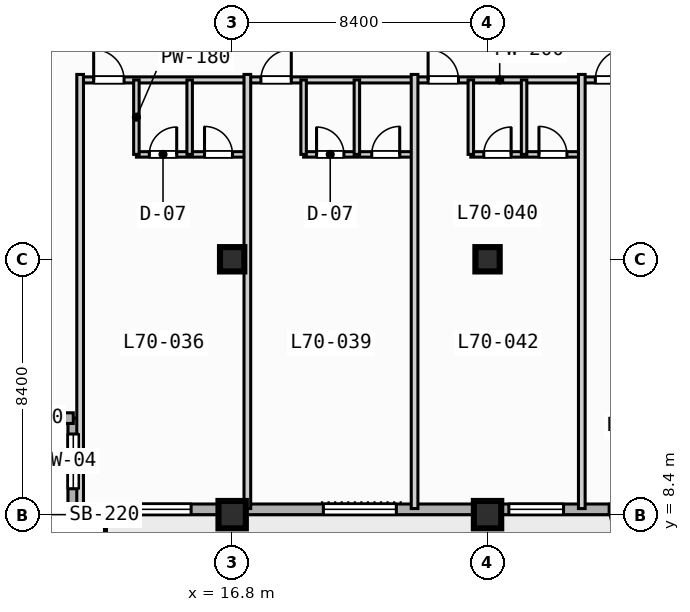
"""IFC4 building model, lengths in metres.
Left out: names, types, materials, properties, quantities, classifications, styles, units other than length and angle.
Written with IfcOpenShell. Run it as: python <this file> out.ifc"""

import sys

from ifc_helpers import new_model, si_unit, direction, frame, frame_2d, origin, origin_2d, place, context, subcontext, project, spatial, rectangle, extrude, element, fill, save


model = new_model("IFC4")
c1 = context("Model", 3, precision=1e-05, world=origin(), true_north=direction((0.0, 1.0)))
c2 = subcontext(c1, "Body", "Model", "MODEL_VIEW")
j1 = project(units=[si_unit("LENGTHUNIT", "METRE"), si_unit("PLANEANGLEUNIT", "RADIAN")], contexts=[c1])
p1 = place(None, origin())
s1 = spatial("IfcSite", under=j1, at=p1, CompositionType="ELEMENT")
p2 = place(p1, origin())
s2 = spatial("IfcBuilding", under=s1, at=p2, CompositionType="ELEMENT")
p3 = place(p2, frame((0.0, 0.0, 282.3)))
s3 = spatial("IfcBuildingStorey", under=s2, at=p3, CompositionType="ELEMENT", Elevation=282.3)
p4 = place(p3, frame((16.8, 8.4, 0.0), z_axis=(0.0, 0.0, 1.0), x_axis=(1.0, 0.0, 0.0)))
e1 = element("IfcColumn", 1, at=p4, inside=s3, PredefinedType="COLUMN", context=c2, shape_type="SweptSolid", body=[
    extrude(rectangle(XDim=0.9, YDim=0.9, at=origin_2d()), origin(), (0.0, 0.0, 1.0), 3.7),
])
p5 = place(p3, frame((16.8, 16.8, 0.0), z_axis=(0.0, 0.0, 1.0), x_axis=(1.0, 0.0, 0.0)))
e2 = element("IfcColumn", 2, at=p5, inside=s3, PredefinedType="COLUMN", context=c2, shape_type="SweptSolid", body=[
    extrude(rectangle(XDim=0.8, YDim=0.8, at=origin_2d()), origin(), (0.0, 0.0, 1.0), 3.7),
])
p6 = place(p3, frame((25.2, 8.4, 0.0), z_axis=(0.0, 0.0, 1.0), x_axis=(1.0, 0.0, 0.0)))
e3 = element("IfcColumn", 3, at=p6, inside=s3, PredefinedType="COLUMN", context=c2, shape_type="SweptSolid", body=[
    extrude(rectangle(XDim=0.9, YDim=0.9, at=origin_2d()), origin(), (0.0, 0.0, 1.0), 3.7),
])
p7 = place(p3, frame((25.2, 16.8, 0.0), z_axis=(0.0, 0.0, 1.0), x_axis=(1.0, 0.0, 0.0)))
e4 = element("IfcColumn", 4, at=p7, inside=s3, PredefinedType="COLUMN", context=c2, shape_type="SweptSolid", body=[
    extrude(rectangle(XDim=0.8, YDim=0.8, at=origin_2d()), origin(), (0.0, 0.0, 1.0), 3.7),
])
p8 = place(p3, frame((11.575, 8.575, 0.0), z_axis=(0.0, 0.0, 1.0), x_axis=(0.0, 1.0, 0.0)))
e5 = element("IfcWall", 5, at=p8, inside=s3, PredefinedType="STANDARD", context=c2, shape_type="SweptSolid", body=[
    extrude(rectangle(XDim=3.0, YDim=0.35, at=frame_2d((1.5, 0.0))), origin(), (0.0, 0.0, 1.0), 3.47),
])
p9 = place(p8, frame((0.677, 0.0, 0.85)))
e6 = element("IfcOpeningElement", 6, at=p9, cuts=e5, PredefinedType="OPENING", context=c2, shape_type="SweptSolid", body=[
    extrude(rectangle(XDim=1.8, YDim=1.8, at=frame_2d((0.9, 0.9))), frame((0.0, 0.185, 0.0), z_axis=(0.0, -1.0, 0.0), x_axis=(1.0, 0.0, 0.0)), (0.0, 0.0, 1.0), 0.37),
])
p10 = place(p3, frame((11.575, 11.575, 0.0), z_axis=(0.0, 0.0, 1.0), x_axis=(-1.0, 0.0, 0.0)))
e7 = element("IfcWall", 7, at=p10, inside=s3, PredefinedType="STANDARD", context=c2, shape_type="SweptSolid", body=[
    extrude(rectangle(XDim=3.0, YDim=0.35, at=frame_2d((1.5, 0.0))), origin(), (0.0, 0.0, 1.0), 3.47),
])
p11 = place(p3, frame((72.425, 8.575, 0.0), z_axis=(0.0, 0.0, 1.0), x_axis=(-1.0, 0.0, 0.0)))
e8 = element("IfcWall", 8, at=p11, inside=s3, PredefinedType="STANDARD", context=c2, shape_type="SweptSolid", body=[
    extrude(rectangle(XDim=60.85, YDim=0.35, at=frame_2d((30.425, 0.0))), origin(), (0.0, 0.0, 1.0), 3.47),
])
p12 = place(p11, frame((41.825, 0.0, 0.0)))
e9 = element("IfcOpeningElement", 9, at=p12, cuts=e8, PredefinedType="OPENING", context=c2, shape_type="SweptSolid", body=[
    extrude(rectangle(XDim=1.4, YDim=2.2, at=frame_2d((0.7, 1.1))), frame((0.0, 0.185, 0.0), z_axis=(0.0, -1.0, 0.0), x_axis=(1.0, 0.0, 0.0)), (0.0, 0.0, 1.0), 0.37),
])
p13 = place(p11, frame((50.225, 0.0, 0.85)))
e10 = element("IfcOpeningElement", 10, at=p13, cuts=e8, PredefinedType="OPENING", context=c2, shape_type="SweptSolid", body=[
    extrude(rectangle(XDim=2.4, YDim=1.95, at=frame_2d((1.2, 0.975))), frame((0.0, 0.185, 0.0), z_axis=(0.0, -1.0, 0.0), x_axis=(1.0, 0.0, 0.0)), (0.0, 0.0, 1.0), 0.37),
])
p14 = place(p11, frame((33.425, 0.0, 0.85)))
e11 = element("IfcOpeningElement", 11, at=p14, cuts=e8, PredefinedType="OPENING", context=c2, shape_type="SweptSolid", body=[
    extrude(rectangle(XDim=2.4, YDim=1.95, at=frame_2d((1.2, 0.975))), frame((0.0, 0.185, 0.0), z_axis=(0.0, -1.0, 0.0), x_axis=(1.0, 0.0, 0.0)), (0.0, 0.0, 1.0), 0.37),
])
p15 = place(p11, frame((25.325, 0.0, 0.85)))
e12 = element("IfcOpeningElement", 12, at=p15, cuts=e8, PredefinedType="OPENING", context=c2, shape_type="SweptSolid", body=[
    extrude(rectangle(XDim=1.8, YDim=1.8, at=frame_2d((0.9, 0.9))), frame((0.0, 0.185, 0.0), z_axis=(0.0, -1.0, 0.0), x_axis=(1.0, 0.0, 0.0)), (0.0, 0.0, 1.0), 0.37),
])
p16 = place(p11, frame((56.975, 0.0, 0.85)))
e13 = element("IfcOpeningElement", 13, at=p16, cuts=e8, PredefinedType="OPENING", context=c2, shape_type="SweptSolid", body=[
    extrude(rectangle(XDim=1.8, YDim=1.8, at=frame_2d((0.9, 0.9))), frame((0.0, 0.185, 0.0), z_axis=(0.0, -1.0, 0.0), x_axis=(1.0, 0.0, 0.0)), (0.0, 0.0, 1.0), 0.37),
])
p17 = place(p11, frame((44.725, 0.0, 0.85)))
e14 = element("IfcOpeningElement", 14, at=p17, cuts=e8, PredefinedType="OPENING", context=c2, shape_type="SweptSolid", body=[
    extrude(rectangle(XDim=1.8, YDim=1.8, at=frame_2d((0.9, 0.9))), frame((0.0, 0.185, 0.0), z_axis=(0.0, -1.0, 0.0), x_axis=(1.0, 0.0, 0.0)), (0.0, 0.0, 1.0), 0.37),
])
p18 = place(p3, frame((11.8, 22.7, 0.0), z_axis=(0.0, 0.0, 1.0), x_axis=(1.0, 0.0, 0.0)))
e15 = element("IfcWall", 15, at=p18, inside=s3, PredefinedType="PARTITIONING", context=c2, shape_type="SweptSolid", body=[
    extrude(rectangle(XDim=27.6, YDim=0.2, at=frame_2d((13.8, 0.0))), origin(), (0.0, 0.0, 1.0), 3.47),
])
p19 = place(p18, frame((0.445, 0.0, 0.0)))
e16 = element("IfcOpeningElement", 16, at=p19, cuts=e15, PredefinedType="OPENING", context=c2, shape_type="SweptSolid", body=[
    extrude(rectangle(XDim=1.0, YDim=2.15, at=frame_2d((0.5, 1.075))), frame((0.0, 0.11, 0.0), z_axis=(0.0, -1.0, 0.0), x_axis=(1.0, 0.0, 0.0)), (0.0, 0.0, 1.0), 0.22),
])
p20 = place(p18, frame((5.945, 0.0, 0.0)))
e17 = element("IfcOpeningElement", 17, at=p20, cuts=e15, PredefinedType="OPENING", context=c2, shape_type="SweptSolid", body=[
    extrude(rectangle(XDim=1.0, YDim=2.15, at=frame_2d((0.5, 1.075))), frame((0.0, 0.11, 0.0), z_axis=(0.0, -1.0, 0.0), x_axis=(1.0, 0.0, 0.0)), (0.0, 0.0, 1.0), 0.22),
])
p21 = place(p18, frame((11.445, 0.0, 0.0)))
e18 = element("IfcOpeningElement", 18, at=p21, cuts=e15, PredefinedType="OPENING", context=c2, shape_type="SweptSolid", body=[
    extrude(rectangle(XDim=1.0, YDim=2.15, at=frame_2d((0.5, 1.075))), frame((0.0, 0.11, 0.0), z_axis=(0.0, -1.0, 0.0), x_axis=(1.0, 0.0, 0.0)), (0.0, 0.0, 1.0), 0.22),
])
p22 = place(p18, frame((16.945, 0.0, 0.0)))
e19 = element("IfcOpeningElement", 19, at=p22, cuts=e15, PredefinedType="OPENING", context=c2, shape_type="SweptSolid", body=[
    extrude(rectangle(XDim=1.0, YDim=2.15, at=frame_2d((0.5, 1.075))), frame((0.0, 0.11, 0.0), z_axis=(0.0, -1.0, 0.0), x_axis=(1.0, 0.0, 0.0)), (0.0, 0.0, 1.0), 0.22),
])
p23 = place(p18, frame((22.445, 0.0, 0.0)))
e20 = element("IfcOpeningElement", 20, at=p23, cuts=e15, PredefinedType="OPENING", context=c2, shape_type="SweptSolid", body=[
    extrude(rectangle(XDim=1.0, YDim=2.15, at=frame_2d((0.5, 1.075))), frame((0.0, 0.11, 0.0), z_axis=(0.0, -1.0, 0.0), x_axis=(1.0, 0.0, 0.0)), (0.0, 0.0, 1.0), 0.22),
])
p24 = place(p3, frame((11.8, 8.6, 0.0), z_axis=(0.0, 0.0, 1.0), x_axis=(0.0, 1.0, 0.0)))
e21 = element("IfcWall", 21, at=p24, inside=s3, PredefinedType="PARTITIONING", context=c2, shape_type="SweptSolid", body=[
    extrude(rectangle(XDim=14.28, YDim=0.22, at=frame_2d((7.14, 0.0))), origin(), (0.0, 0.0, 1.0), 3.47),
])
p25 = place(p3, frame((13.65, 20.25, 0.0), z_axis=(0.0, 0.0, 1.0), x_axis=(1.0, 0.0, 0.0)))
e22 = element("IfcWall", 22, at=p25, inside=s3, PredefinedType="PLUMBINGWALL", context=c2, shape_type="SweptSolid", body=[
    extrude(rectangle(XDim=3.65, YDim=0.18, at=frame_2d((1.825, 0.0))), origin(), (0.0, 0.0, 1.0), 3.47),
])
p26 = place(p25, frame((0.426, 0.0, 0.0)))
e23 = element("IfcOpeningElement", 23, at=p26, cuts=e22, PredefinedType="OPENING", context=c2, shape_type="SweptSolid", body=[
    extrude(rectangle(XDim=0.9, YDim=2.1, at=frame_2d((0.45, 1.05))), frame((0.0, 0.1, 0.0), z_axis=(0.0, -1.0, 0.0), x_axis=(1.0, 0.0, 0.0)), (0.0, 0.0, 1.0), 0.2),
])
p27 = place(p25, frame((2.241, 0.0, 0.0)))
e24 = element("IfcOpeningElement", 24, at=p27, cuts=e22, PredefinedType="OPENING", context=c2, shape_type="SweptSolid", body=[
    extrude(rectangle(XDim=0.92, YDim=2.1, at=frame_2d((0.46, 1.05))), frame((0.0, 0.1, 0.0), z_axis=(0.0, -1.0, 0.0), x_axis=(1.0, 0.0, 0.0)), (0.0, 0.0, 1.0), 0.2),
])
for number, where, z_axis, x_axis in (
    (25, (13.65, 20.25, 0.0), (0.0, 0.0, 1.0), (0.0, 1.0, 0.0)),
    (26, (15.402, 20.25, 0.0), (0.0, 0.0, 1.0), (0.0, 1.0, 0.0)),
):
    element("IfcWall", number, at=place(p3, frame(where, z_axis=z_axis, x_axis=x_axis)), inside=s3, PredefinedType="PLUMBINGWALL", context=c2, shape_type="SweptSolid", body=[
        extrude(rectangle(XDim=2.45, YDim=0.18, at=frame_2d((1.225, 0.0))), origin(), (0.0, 0.0, 1.0), 3.47),
    ])
p28 = place(p3, frame((17.3, 8.6, 0.0), z_axis=(0.0, 0.0, 1.0), x_axis=(0.0, 1.0, 0.0)))
e27 = element("IfcWall", 27, at=p28, inside=s3, PredefinedType="PARTITIONING", context=c2, shape_type="SweptSolid", body=[
    extrude(rectangle(XDim=14.28, YDim=0.22, at=frame_2d((7.14, 0.0))), origin(), (0.0, 0.0, 1.0), 3.47),
])
p29 = place(p3, frame((19.15, 20.25, 0.0), z_axis=(0.0, 0.0, 1.0), x_axis=(1.0, 0.0, 0.0)))
e28 = element("IfcWall", 28, at=p29, inside=s3, PredefinedType="PLUMBINGWALL", context=c2, shape_type="SweptSolid", body=[
    extrude(rectangle(XDim=3.65, YDim=0.18, at=frame_2d((1.825, 0.0))), origin(), (0.0, 0.0, 1.0), 3.47),
])
p30 = place(p29, frame((0.426, 0.0, 0.0)))
e29 = element("IfcOpeningElement", 29, at=p30, cuts=e28, PredefinedType="OPENING", context=c2, shape_type="SweptSolid", body=[
    extrude(rectangle(XDim=0.9, YDim=2.1, at=frame_2d((0.45, 1.05))), frame((0.0, 0.1, 0.0), z_axis=(0.0, -1.0, 0.0), x_axis=(1.0, 0.0, 0.0)), (0.0, 0.0, 1.0), 0.2),
])
p31 = place(p29, frame((2.241, 0.0, 0.0)))
e30 = element("IfcOpeningElement", 30, at=p31, cuts=e28, PredefinedType="OPENING", context=c2, shape_type="SweptSolid", body=[
    extrude(rectangle(XDim=0.92, YDim=2.1, at=frame_2d((0.46, 1.05))), frame((0.0, 0.1, 0.0), z_axis=(0.0, -1.0, 0.0), x_axis=(1.0, 0.0, 0.0)), (0.0, 0.0, 1.0), 0.2),
])
for number, where, z_axis, x_axis in (
    (31, (19.15, 20.25, 0.0), (0.0, 0.0, 1.0), (0.0, 1.0, 0.0)),
    (32, (20.902, 20.25, 0.0), (0.0, 0.0, 1.0), (0.0, 1.0, 0.0)),
):
    element("IfcWall", number, at=place(p3, frame(where, z_axis=z_axis, x_axis=x_axis)), inside=s3, PredefinedType="PLUMBINGWALL", context=c2, shape_type="SweptSolid", body=[
        extrude(rectangle(XDim=2.45, YDim=0.18, at=frame_2d((1.225, 0.0))), origin(), (0.0, 0.0, 1.0), 3.47),
    ])
p32 = place(p3, frame((22.8, 8.6, 0.0), z_axis=(0.0, 0.0, 1.0), x_axis=(0.0, 1.0, 0.0)))
e33 = element("IfcWall", 33, at=p32, inside=s3, PredefinedType="PARTITIONING", context=c2, shape_type="SweptSolid", body=[
    extrude(rectangle(XDim=14.28, YDim=0.22, at=frame_2d((7.14, 0.0))), origin(), (0.0, 0.0, 1.0), 3.47),
])
p33 = place(p3, frame((24.65, 20.25, 0.0), z_axis=(0.0, 0.0, 1.0), x_axis=(1.0, 0.0, 0.0)))
e34 = element("IfcWall", 34, at=p33, inside=s3, PredefinedType="PLUMBINGWALL", context=c2, shape_type="SweptSolid", body=[
    extrude(rectangle(XDim=3.65, YDim=0.18, at=frame_2d((1.825, 0.0))), origin(), (0.0, 0.0, 1.0), 3.47),
])
p34 = place(p33, frame((0.426, 0.0, 0.0)))
e35 = element("IfcOpeningElement", 35, at=p34, cuts=e34, PredefinedType="OPENING", context=c2, shape_type="SweptSolid", body=[
    extrude(rectangle(XDim=0.9, YDim=2.1, at=frame_2d((0.45, 1.05))), frame((0.0, 0.1, 0.0), z_axis=(0.0, -1.0, 0.0), x_axis=(1.0, 0.0, 0.0)), (0.0, 0.0, 1.0), 0.2),
])
p35 = place(p33, frame((2.241, 0.0, 0.0)))
e36 = element("IfcOpeningElement", 36, at=p35, cuts=e34, PredefinedType="OPENING", context=c2, shape_type="SweptSolid", body=[
    extrude(rectangle(XDim=0.92, YDim=2.1, at=frame_2d((0.46, 1.05))), frame((0.0, 0.1, 0.0), z_axis=(0.0, -1.0, 0.0), x_axis=(1.0, 0.0, 0.0)), (0.0, 0.0, 1.0), 0.2),
])
for number, where, z_axis, x_axis in (
    (37, (24.65, 20.25, 0.0), (0.0, 0.0, 1.0), (0.0, 1.0, 0.0)),
    (38, (26.402, 20.25, 0.0), (0.0, 0.0, 1.0), (0.0, 1.0, 0.0)),
):
    element("IfcWall", number, at=place(p3, frame(where, z_axis=z_axis, x_axis=x_axis)), inside=s3, PredefinedType="PLUMBINGWALL", context=c2, shape_type="SweptSolid", body=[
        extrude(rectangle(XDim=2.45, YDim=0.18, at=frame_2d((1.225, 0.0))), origin(), (0.0, 0.0, 1.0), 3.47),
    ])
p36 = place(p3, frame((28.3, 8.6, 0.0), z_axis=(0.0, 0.0, 1.0), x_axis=(0.0, 1.0, 0.0)))
e39 = element("IfcWall", 39, at=p36, inside=s3, PredefinedType="PARTITIONING", context=c2, shape_type="SweptSolid", body=[
    extrude(rectangle(XDim=14.28, YDim=0.22, at=frame_2d((7.14, 0.0))), origin(), (0.0, 0.0, 1.0), 3.47),
])
p37 = place(p9, origin())
e40 = element("IfcWindow", 40, at=p37, inside=s3, PartitioningType="SINGLE_PANEL", PredefinedType="WINDOW", context=c2, shape_type="SweptSolid", body=[
    extrude(rectangle(XDim=1.8, YDim=1.8, at=frame_2d((0.9, 0.9))), frame((0.0, 0.03, 0.0), z_axis=(0.0, -1.0, 0.0), x_axis=(1.0, 0.0, 0.0)), (0.0, 0.0, 1.0), 0.06),
])
fill(e6, e40)
p38 = place(p12, origin())
e41 = element("IfcDoor", 41, at=p38, inside=s3, OperationType="SINGLE_SWING_LEFT", PredefinedType="DOOR", context=c2, shape_type="SweptSolid", body=[
    extrude(rectangle(XDim=1.4, YDim=2.2, at=frame_2d((0.7, 1.1))), frame((0.0, 0.025, 0.0), z_axis=(0.0, -1.0, 0.0), x_axis=(1.0, 0.0, 0.0)), (0.0, 0.0, 1.0), 0.05),
])
fill(e9, e41)
p39 = place(p13, origin())
e42 = element("IfcWindow", 42, at=p39, inside=s3, PartitioningType="SINGLE_PANEL", PredefinedType="WINDOW", context=c2, shape_type="SweptSolid", body=[
    extrude(rectangle(XDim=2.4, YDim=1.95, at=frame_2d((1.2, 0.975))), frame((0.0, 0.03, 0.0), z_axis=(0.0, -1.0, 0.0), x_axis=(1.0, 0.0, 0.0)), (0.0, 0.0, 1.0), 0.06),
])
fill(e10, e42)
p40 = place(p16, origin())
e43 = element("IfcWindow", 43, at=p40, inside=s3, PartitioningType="SINGLE_PANEL", PredefinedType="WINDOW", context=c2, shape_type="SweptSolid", body=[
    extrude(rectangle(XDim=1.8, YDim=1.8, at=frame_2d((0.9, 0.9))), frame((0.0, 0.03, 0.0), z_axis=(0.0, -1.0, 0.0), x_axis=(1.0, 0.0, 0.0)), (0.0, 0.0, 1.0), 0.06),
])
fill(e13, e43)
p41 = place(p17, origin())
e44 = element("IfcWindow", 44, at=p41, inside=s3, PartitioningType="SINGLE_PANEL", PredefinedType="WINDOW", context=c2, shape_type="SweptSolid", body=[
    extrude(rectangle(XDim=1.8, YDim=1.8, at=frame_2d((0.9, 0.9))), frame((0.0, 0.03, 0.0), z_axis=(0.0, -1.0, 0.0), x_axis=(1.0, 0.0, 0.0)), (0.0, 0.0, 1.0), 0.06),
])
fill(e14, e44)
p42 = place(p19, origin())
e45 = element("IfcDoor", 45, at=p42, inside=s3, OperationType="SINGLE_SWING_LEFT", PredefinedType="DOOR", context=c2, shape_type="SweptSolid", body=[
    extrude(rectangle(XDim=1.0, YDim=2.15, at=frame_2d((0.5, 1.075))), frame((0.0, 0.025, 0.0), z_axis=(0.0, -1.0, 0.0), x_axis=(1.0, 0.0, 0.0)), (0.0, 0.0, 1.0), 0.05),
])
fill(e16, e45)
p43 = place(p20, origin())
e46 = element("IfcDoor", 46, at=p43, inside=s3, OperationType="SINGLE_SWING_RIGHT", PredefinedType="DOOR", context=c2, shape_type="SweptSolid", body=[
    extrude(rectangle(XDim=1.0, YDim=2.15, at=frame_2d((0.5, 1.075))), frame((0.0, 0.025, 0.0), z_axis=(0.0, -1.0, 0.0), x_axis=(1.0, 0.0, 0.0)), (0.0, 0.0, 1.0), 0.05),
])
fill(e17, e46)
p44 = place(p21, origin())
e47 = element("IfcDoor", 47, at=p44, inside=s3, OperationType="SINGLE_SWING_LEFT", PredefinedType="DOOR", context=c2, shape_type="SweptSolid", body=[
    extrude(rectangle(XDim=1.0, YDim=2.15, at=frame_2d((0.5, 1.075))), frame((0.0, 0.025, 0.0), z_axis=(0.0, -1.0, 0.0), x_axis=(1.0, 0.0, 0.0)), (0.0, 0.0, 1.0), 0.05),
])
fill(e18, e47)
p45 = place(p22, origin())
e48 = element("IfcDoor", 48, at=p45, inside=s3, OperationType="SINGLE_SWING_RIGHT", PredefinedType="DOOR", context=c2, shape_type="SweptSolid", body=[
    extrude(rectangle(XDim=1.0, YDim=2.15, at=frame_2d((0.5, 1.075))), frame((0.0, 0.025, 0.0), z_axis=(0.0, -1.0, 0.0), x_axis=(1.0, 0.0, 0.0)), (0.0, 0.0, 1.0), 0.05),
])
fill(e19, e48)
p46 = place(p26, origin())
e49 = element("IfcDoor", 49, at=p46, inside=s3, OperationType="SINGLE_SWING_RIGHT", PredefinedType="DOOR", context=c2, shape_type="SweptSolid", body=[
    extrude(rectangle(XDim=0.9, YDim=2.1, at=frame_2d((0.45, 1.05))), frame((0.0, 0.025, 0.0), z_axis=(0.0, -1.0, 0.0), x_axis=(1.0, 0.0, 0.0)), (0.0, 0.0, 1.0), 0.05),
])
fill(e23, e49)
p47 = place(p27, origin())
e50 = element("IfcDoor", 50, at=p47, inside=s3, OperationType="SINGLE_SWING_LEFT", PredefinedType="DOOR", context=c2, shape_type="SweptSolid", body=[
    extrude(rectangle(XDim=0.92, YDim=2.1, at=frame_2d((0.46, 1.05))), frame((0.0, 0.025, 0.0), z_axis=(0.0, -1.0, 0.0), x_axis=(1.0, 0.0, 0.0)), (0.0, 0.0, 1.0), 0.05),
])
fill(e24, e50)
p48 = place(p30, origin())
e51 = element("IfcDoor", 51, at=p48, inside=s3, OperationType="SINGLE_SWING_LEFT", PredefinedType="DOOR", context=c2, shape_type="SweptSolid", body=[
    extrude(rectangle(XDim=0.9, YDim=2.1, at=frame_2d((0.45, 1.05))), frame((0.0, 0.025, 0.0), z_axis=(0.0, -1.0, 0.0), x_axis=(1.0, 0.0, 0.0)), (0.0, 0.0, 1.0), 0.05),
])
fill(e29, e51)
p49 = place(p31, origin())
e52 = element("IfcDoor", 52, at=p49, inside=s3, OperationType="SINGLE_SWING_RIGHT", PredefinedType="DOOR", context=c2, shape_type="SweptSolid", body=[
    extrude(rectangle(XDim=0.92, YDim=2.1, at=frame_2d((0.46, 1.05))), frame((0.0, 0.025, 0.0), z_axis=(0.0, -1.0, 0.0), x_axis=(1.0, 0.0, 0.0)), (0.0, 0.0, 1.0), 0.05),
])
fill(e30, e52)
p50 = place(p34, origin())
e53 = element("IfcDoor", 53, at=p50, inside=s3, OperationType="SINGLE_SWING_RIGHT", PredefinedType="DOOR", context=c2, shape_type="SweptSolid", body=[
    extrude(rectangle(XDim=0.9, YDim=2.1, at=frame_2d((0.45, 1.05))), frame((0.0, 0.025, 0.0), z_axis=(0.0, -1.0, 0.0), x_axis=(1.0, 0.0, 0.0)), (0.0, 0.0, 1.0), 0.05),
])
fill(e35, e53)
p51 = place(p35, origin())
e54 = element("IfcDoor", 54, at=p51, inside=s3, OperationType="SINGLE_SWING_LEFT", PredefinedType="DOOR", context=c2, shape_type="SweptSolid", body=[
    extrude(rectangle(XDim=0.92, YDim=2.1, at=frame_2d((0.46, 1.05))), frame((0.0, 0.025, 0.0), z_axis=(0.0, -1.0, 0.0), x_axis=(1.0, 0.0, 0.0)), (0.0, 0.0, 1.0), 0.05),
])
fill(e36, e54)
save(model, sys.argv[1])
